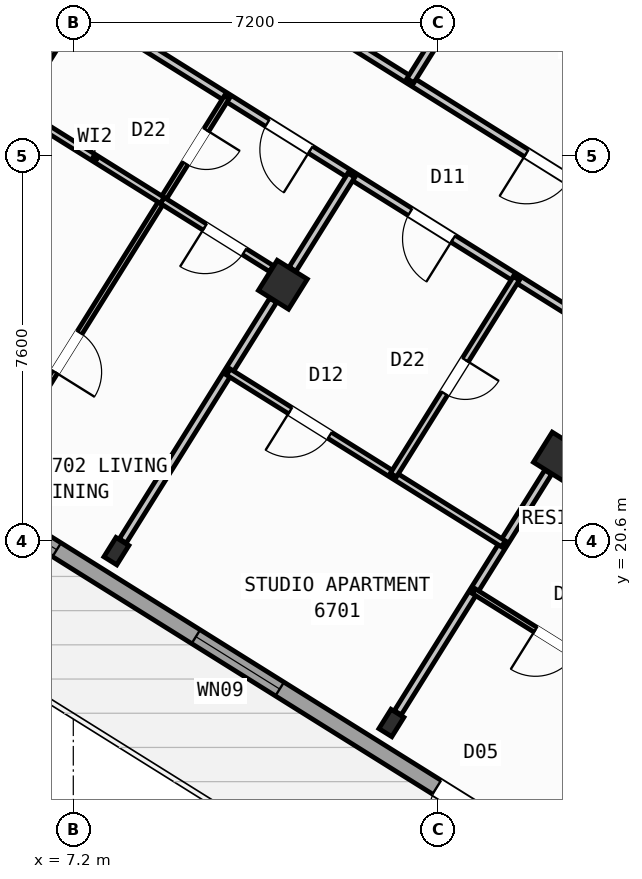
"""IFC4 building model, lengths in metres.
Left out: names, types, materials, properties, quantities, classifications, styles, units other than length and angle.
Written with IfcOpenShell. Run it as: python <this file> out.ifc"""

import sys

from ifc_helpers import new_model, si_unit, direction, frame, frame_2d, origin, origin_2d, place, context, subcontext, project, spatial, rectangle, hollow_rectangle, i_section, extrude, source, transform, mapped, element, fill, save


model = new_model("IFC4")
c1 = context("Model", 3, precision=1e-05, world=origin(), true_north=direction((0.0, 1.0)))
c2 = subcontext(c1, "Body", "Model", "MODEL_VIEW")
j1 = project(units=[si_unit("LENGTHUNIT", "METRE"), si_unit("PLANEANGLEUNIT", "RADIAN")], contexts=[c1])
p1 = place(None, origin())
s1 = spatial("IfcSite", under=j1, at=p1, CompositionType="ELEMENT")
p2 = place(p1, origin())
s2 = spatial("IfcBuilding", under=s1, at=p2, CompositionType="ELEMENT")
p3 = place(p2, frame((0.0, 0.0, 266.4)))
s3 = spatial("IfcBuildingStorey", under=s2, at=p3, CompositionType="ELEMENT", Elevation=266.4)
m1 = source(origin(), c2, "Body", "SweptSolid", [
    extrude(hollow_rectangle(XDim=0.7, YDim=0.7, WallThickness=0.028, at=origin_2d()), origin(), (0.0, 0.0, 1.0), 3.6),
])
p4 = place(p3, frame((16.764, 22.261, 0.0), z_axis=(0.0, 0.0, 1.0), x_axis=(-0.848048096156, 0.529919264233, 0.0)))
e1 = element("IfcColumn", 1, at=p4, inside=s3, PredefinedType="COLUMN", context=c2, shape_type="MappedRepresentation", body=[
    mapped(m1, transform((0.0, 0.0, 0.0), scale=1.0)),
])
m2 = source(origin(), c2, "Body", "SweptSolid", [
    extrude(i_section(OverallWidth=0.3, OverallDepth=0.45, WebThickness=0.014, FlangeThickness=0.026, at=origin_2d()), origin(), (0.0, 0.0, 1.0), 3.6),
])
p5 = place(p3, frame((13.478, 17.003, 0.0), z_axis=(0.0, 0.0, 1.0), x_axis=(-0.848048096156, 0.529919264233, 0.0)))
e2 = element("IfcColumn", 2, at=p5, inside=s3, PredefinedType="COLUMN", context=c2, shape_type="MappedRepresentation", body=[
    mapped(m2, transform((0.0, 0.0, 0.0), scale=1.0)),
])
p6 = place(p3, frame((11.336, 25.653, 0.0), z_axis=(0.0, 0.0, 1.0), x_axis=(-0.848048096156, 0.529919264233, 0.0)))
e3 = element("IfcColumn", 3, at=p6, inside=s3, PredefinedType="COLUMN", context=c2, shape_type="MappedRepresentation", body=[
    mapped(m1, transform((0.0, 0.0, 0.0), scale=1.0)),
])
p7 = place(p3, frame((8.051, 20.395, 0.0), z_axis=(0.0, 0.0, 1.0), x_axis=(-0.848048096156, 0.529919264233, 0.0)))
e4 = element("IfcColumn", 4, at=p7, inside=s3, PredefinedType="COLUMN", context=c2, shape_type="MappedRepresentation", body=[
    mapped(m2, transform((0.0, 0.0, 0.0), scale=1.0)),
])
p8 = place(p3, frame((29.268, 6.429, 0.0), z_axis=(0.0, 0.0, 1.0), x_axis=(-0.848049971435, 0.529916263149, 0.0)))
e5 = element("IfcWall", 5, at=p8, inside=s3, PredefinedType="STANDARD", context=c2, shape_type="SweptSolid", body=[
    extrude(rectangle(XDim=31.588, YDim=0.32, at=frame_2d((15.794, 0.0))), origin(), (0.0, 0.0, 1.0), 3.35),
])
p9 = place(p8, frame((16.362, 0.0, 0.0)))
e6 = element("IfcOpeningElement", 6, at=p9, cuts=e5, PredefinedType="OPENING", context=c2, shape_type="SweptSolid", body=[
    extrude(rectangle(XDim=1.2, YDim=2.15, at=frame_2d((0.6, 1.075))), frame((0.0, 0.17, 0.0), z_axis=(0.0, -1.0, 0.0), x_axis=(1.0, 0.0, 0.0)), (0.0, 0.0, 1.0), 0.34),
])
p10 = place(p8, frame((3.859, 0.0, 0.9)))
e7 = element("IfcOpeningElement", 7, at=p10, cuts=e5, PredefinedType="OPENING", context=c2, shape_type="SweptSolid", body=[
    extrude(rectangle(XDim=1.65, YDim=1.45, at=frame_2d((0.825, 0.725))), frame((0.0, 0.17, 0.0), z_axis=(0.0, -1.0, 0.0), x_axis=(1.0, 0.0, 0.0)), (0.0, 0.0, 1.0), 0.34),
])
p11 = place(p8, frame((10.519, 0.0, 0.9)))
e8 = element("IfcOpeningElement", 8, at=p11, cuts=e5, PredefinedType="OPENING", context=c2, shape_type="SweptSolid", body=[
    extrude(rectangle(XDim=1.65, YDim=1.45, at=frame_2d((0.825, 0.725))), frame((0.0, 0.17, 0.0), z_axis=(0.0, -1.0, 0.0), x_axis=(1.0, 0.0, 0.0)), (0.0, 0.0, 1.0), 0.34),
])
p12 = place(p8, frame((21.219, 0.0, 0.95)))
e9 = element("IfcOpeningElement", 9, at=p12, cuts=e5, PredefinedType="OPENING", context=c2, shape_type="SweptSolid", body=[
    extrude(rectangle(XDim=1.95, YDim=1.35, at=frame_2d((0.975, 0.675))), frame((0.0, 0.17, 0.0), z_axis=(0.0, -1.0, 0.0), x_axis=(1.0, 0.0, 0.0)), (0.0, 0.0, 1.0), 0.34),
])
p13 = place(p8, frame((26.406, 0.0, 1.0)))
e10 = element("IfcOpeningElement", 10, at=p13, cuts=e5, PredefinedType="OPENING", context=c2, shape_type="SweptSolid", body=[
    extrude(rectangle(XDim=0.9, YDim=1.25, at=frame_2d((0.45, 0.625))), frame((0.0, 0.17, 0.0), z_axis=(0.0, -1.0, 0.0), x_axis=(1.0, 0.0, 0.0)), (0.0, 0.0, 1.0), 0.34),
])
p14 = place(p8, frame((29.143, 0.0, 0.9)))
e11 = element("IfcOpeningElement", 11, at=p14, cuts=e5, PredefinedType="OPENING", context=c2, shape_type="SweptSolid", body=[
    extrude(rectangle(XDim=1.65, YDim=1.45, at=frame_2d((0.825, 0.725))), frame((0.0, 0.17, 0.0), z_axis=(0.0, -1.0, 0.0), x_axis=(1.0, 0.0, 0.0)), (0.0, 0.0, 1.0), 0.34),
])
p15 = place(p3, frame((2.415, 23.452, 0.0), z_axis=(0.0, 0.0, 1.0), x_axis=(0.52991049553, 0.848053575387, 0.0)))
e12 = element("IfcWall", 12, at=p15, inside=s3, PredefinedType="STANDARD", context=c2, shape_type="SweptSolid", body=[
    extrude(rectangle(XDim=21.587, YDim=0.32, at=frame_2d((10.794, 0.0))), origin(), (0.0, 0.0, 1.0), 2.875),
])
p16 = place(p15, frame((2.606, 0.0, 0.9)))
e13 = element("IfcOpeningElement", 13, at=p16, cuts=e12, PredefinedType="OPENING", context=c2, shape_type="SweptSolid", body=[
    extrude(rectangle(XDim=1.65, YDim=1.45, at=frame_2d((0.825, 0.725))), frame((0.0, 0.17, 0.0), z_axis=(0.0, -1.0, 0.0), x_axis=(1.0, 0.0, 0.0)), (0.0, 0.0, 1.0), 0.34),
])
p17 = place(p15, frame((7.504, 0.0, 1.0)))
e14 = element("IfcOpeningElement", 14, at=p17, cuts=e12, PredefinedType="OPENING", context=c2, shape_type="SweptSolid", body=[
    extrude(rectangle(XDim=0.9, YDim=1.25, at=frame_2d((0.45, 0.625))), frame((0.0, 0.17, 0.0), z_axis=(0.0, -1.0, 0.0), x_axis=(1.0, 0.0, 0.0)), (0.0, 0.0, 1.0), 0.34),
])
p18 = place(p15, frame((12.084, 0.0, 1.0)))
e15 = element("IfcOpeningElement", 15, at=p18, cuts=e12, PredefinedType="OPENING", context=c2, shape_type="SweptSolid", body=[
    extrude(rectangle(XDim=0.9, YDim=1.25, at=frame_2d((0.45, 0.625))), frame((0.0, 0.17, 0.0), z_axis=(0.0, -1.0, 0.0), x_axis=(1.0, 0.0, 0.0)), (0.0, 0.0, 1.0), 0.34),
])
p19 = place(p15, frame((15.619, 0.0, 1.0)))
e16 = element("IfcOpeningElement", 16, at=p19, cuts=e12, PredefinedType="OPENING", context=c2, shape_type="SweptSolid", body=[
    extrude(rectangle(XDim=0.9, YDim=1.25, at=frame_2d((0.45, 0.625))), frame((0.0, 0.17, 0.0), z_axis=(0.0, -1.0, 0.0), x_axis=(1.0, 0.0, 0.0)), (0.0, 0.0, 1.0), 0.34),
])
p20 = place(p15, frame((18.569, 0.0, 1.0)))
e17 = element("IfcOpeningElement", 17, at=p20, cuts=e12, PredefinedType="OPENING", context=c2, shape_type="SweptSolid", body=[
    extrude(rectangle(XDim=0.9, YDim=1.25, at=frame_2d((0.45, 0.625))), frame((0.0, 0.17, 0.0), z_axis=(0.0, -1.0, 0.0), x_axis=(1.0, 0.0, 0.0)), (0.0, 0.0, 1.0), 0.34),
])
p21 = place(p3, frame((14.138, 41.825, 0.0), z_axis=(0.0, 0.0, 1.0), x_axis=(0.848046498049, -0.529921821731, 0.0)))
e18 = element("IfcWall", 18, at=p21, inside=s3, PredefinedType="STANDARD", context=c2, shape_type="SweptSolid", body=[
    extrude(rectangle(XDim=31.588, YDim=0.32, at=frame_2d((15.794, 0.0))), origin(), (0.0, 0.0, 1.0), 3.35),
])
p22 = place(p21, frame((3.46, 0.0, 0.0)))
e19 = element("IfcOpeningElement", 19, at=p22, cuts=e18, PredefinedType="OPENING", context=c2, shape_type="SweptSolid", body=[
    extrude(rectangle(XDim=1.05, YDim=2.15, at=frame_2d((0.525, 1.075))), frame((0.0, 0.17, 0.0), z_axis=(0.0, -1.0, 0.0), x_axis=(1.0, 0.0, 0.0)), (0.0, 0.0, 1.0), 0.34),
])
p23 = place(p21, frame((0.831, 0.0, 1.0)))
e20 = element("IfcOpeningElement", 20, at=p23, cuts=e18, PredefinedType="OPENING", context=c2, shape_type="SweptSolid", body=[
    extrude(rectangle(XDim=0.9, YDim=1.25, at=frame_2d((0.45, 0.625))), frame((0.0, 0.17, 0.0), z_axis=(0.0, -1.0, 0.0), x_axis=(1.0, 0.0, 0.0)), (0.0, 0.0, 1.0), 0.34),
])
p24 = place(p21, frame((8.719, 0.0, 0.9)))
e21 = element("IfcOpeningElement", 21, at=p24, cuts=e18, PredefinedType="OPENING", context=c2, shape_type="SweptSolid", body=[
    extrude(rectangle(XDim=1.35, YDim=1.45, at=frame_2d((0.675, 0.725))), frame((0.0, 0.17, 0.0), z_axis=(0.0, -1.0, 0.0), x_axis=(1.0, 0.0, 0.0)), (0.0, 0.0, 1.0), 0.34),
])
p25 = place(p21, frame((13.599, 0.0, 0.95)))
e22 = element("IfcOpeningElement", 22, at=p25, cuts=e18, PredefinedType="OPENING", context=c2, shape_type="SweptSolid", body=[
    extrude(rectangle(XDim=1.95, YDim=1.35, at=frame_2d((0.975, 0.675))), frame((0.0, 0.17, 0.0), z_axis=(0.0, -1.0, 0.0), x_axis=(1.0, 0.0, 0.0)), (0.0, 0.0, 1.0), 0.34),
])
p26 = place(p21, frame((17.154, 0.0, 1.0)))
e23 = element("IfcOpeningElement", 23, at=p26, cuts=e18, PredefinedType="OPENING", context=c2, shape_type="SweptSolid", body=[
    extrude(rectangle(XDim=0.9, YDim=1.25, at=frame_2d((0.45, 0.625))), frame((0.0, 0.17, 0.0), z_axis=(0.0, -1.0, 0.0), x_axis=(1.0, 0.0, 0.0)), (0.0, 0.0, 1.0), 0.34),
])
p27 = place(p21, frame((21.719, 0.0, 0.9)))
e24 = element("IfcOpeningElement", 24, at=p27, cuts=e18, PredefinedType="OPENING", context=c2, shape_type="SweptSolid", body=[
    extrude(rectangle(XDim=1.65, YDim=1.45, at=frame_2d((0.825, 0.725))), frame((0.0, 0.17, 0.0), z_axis=(0.0, -1.0, 0.0), x_axis=(1.0, 0.0, 0.0)), (0.0, 0.0, 1.0), 0.34),
])
p28 = place(p21, frame((27.419, 0.0, 0.9)))
e25 = element("IfcOpeningElement", 25, at=p28, cuts=e18, PredefinedType="OPENING", context=c2, shape_type="SweptSolid", body=[
    extrude(rectangle(XDim=1.65, YDim=1.45, at=frame_2d((0.825, 0.725))), frame((0.0, 0.17, 0.0), z_axis=(0.0, -1.0, 0.0), x_axis=(1.0, 0.0, 0.0)), (0.0, 0.0, 1.0), 0.34),
])
p29 = place(p3, frame((21.329, 22.416, 0.0), z_axis=(0.0, 0.0, 1.0), x_axis=(-0.529920220799, -0.848047498427, 0.0)))
e26 = element("IfcWall", 26, at=p29, inside=s3, PredefinedType="PARTITIONING", context=c2, shape_type="SweptSolid", body=[
    extrude(rectangle(XDim=9.2, YDim=0.16, at=frame_2d((4.6, 0.0))), origin(), (0.0, 0.0, 1.0), 3.34),
])
p30 = place(p3, frame((22.495, 24.281, 0.0), z_axis=(0.0, 0.0, 1.0), x_axis=(-0.848052408131, 0.529912363569, 0.0)))
e27 = element("IfcWall", 27, at=p30, inside=s3, PredefinedType="PARTITIONING", context=c2, shape_type="SweptSolid", body=[
    extrude(rectangle(XDim=16.73, YDim=0.16, at=frame_2d((8.365, 0.0))), origin(), (0.0, 0.0, 1.0), 3.34),
])
p31 = place(p30, frame((2.22, 0.0, 0.0)))
e28 = element("IfcOpeningElement", 28, at=p31, cuts=e27, PredefinedType="OPENING", context=c2, shape_type="SweptSolid", body=[
    extrude(rectangle(XDim=0.86, YDim=2.05, at=frame_2d((0.43, 1.025))), frame((0.0, 0.09, 0.0), z_axis=(0.0, -1.0, 0.0), x_axis=(1.0, 0.0, 0.0)), (0.0, 0.0, 1.0), 0.18),
])
p32 = place(p30, frame((6.49, 0.0, 0.0)))
e29 = element("IfcOpeningElement", 29, at=p32, cuts=e27, PredefinedType="OPENING", context=c2, shape_type="SweptSolid", body=[
    extrude(rectangle(XDim=1.0, YDim=2.1, at=frame_2d((0.5, 1.05))), frame((0.0, 0.09, 0.0), z_axis=(0.0, -1.0, 0.0), x_axis=(1.0, 0.0, 0.0)), (0.0, 0.0, 1.0), 0.18),
])
p33 = place(p30, frame((14.76, 0.0, 0.0)))
e30 = element("IfcOpeningElement", 30, at=p33, cuts=e27, PredefinedType="OPENING", context=c2, shape_type="SweptSolid", body=[
    extrude(rectangle(XDim=1.0, YDim=2.1, at=frame_2d((0.5, 1.05))), frame((0.0, 0.09, 0.0), z_axis=(0.0, -1.0, 0.0), x_axis=(1.0, 0.0, 0.0)), (0.0, 0.0, 1.0), 0.18),
])
p34 = place(p3, frame((21.329, 22.416, 0.0), z_axis=(0.0, 0.0, 1.0), x_axis=(-0.848052408131, 0.529912363569, 0.0)))
e31 = element("IfcWall", 31, at=p34, inside=s3, PredefinedType="PARTITIONING", context=c2, shape_type="SweptSolid", body=[
    extrude(rectangle(XDim=16.73, YDim=0.16, at=frame_2d((8.365, 0.0))), origin(), (0.0, 0.0, 1.0), 3.34),
])
p35 = place(p34, frame((1.395, 0.0, 0.0)))
e32 = element("IfcOpeningElement", 32, at=p35, cuts=e31, PredefinedType="OPENING", context=c2, shape_type="SweptSolid", body=[
    extrude(rectangle(XDim=1.0, YDim=2.1, at=frame_2d((0.5, 1.05))), frame((0.0, 0.09, 0.0), z_axis=(0.0, -1.0, 0.0), x_axis=(1.0, 0.0, 0.0)), (0.0, 0.0, 1.0), 0.18),
])
p36 = place(p34, frame((7.82, 0.0, 0.0)))
e33 = element("IfcOpeningElement", 33, at=p36, cuts=e31, PredefinedType="OPENING", context=c2, shape_type="SweptSolid", body=[
    extrude(rectangle(XDim=1.0, YDim=2.1, at=frame_2d((0.5, 1.05))), frame((0.0, 0.09, 0.0), z_axis=(0.0, -1.0, 0.0), x_axis=(1.0, 0.0, 0.0)), (0.0, 0.0, 1.0), 0.18),
])
p37 = place(p34, frame((11.14, 0.0, 0.0)))
e34 = element("IfcOpeningElement", 34, at=p37, cuts=e31, PredefinedType="OPENING", context=c2, shape_type="SweptSolid", body=[
    extrude(rectangle(XDim=1.0, YDim=2.1, at=frame_2d((0.5, 1.05))), frame((0.0, 0.09, 0.0), z_axis=(0.0, -1.0, 0.0), x_axis=(1.0, 0.0, 0.0)), (0.0, 0.0, 1.0), 0.18),
])
p38 = place(p3, frame((16.572, 21.954, 0.0), z_axis=(0.0, 0.0, 1.0), x_axis=(-0.529904903214, -0.848057069748, 0.0)))
e35 = element("IfcWall", 35, at=p38, inside=s3, PredefinedType="PARTITIONING", context=c2, shape_type="SweptSolid", body=[
    extrude(rectangle(XDim=5.601, YDim=0.16, at=frame_2d((2.801, 0.0))), origin(), (0.0, 0.0, 1.0), 2.875),
])
p39 = place(p3, frame((18.318, 17.597, 0.0), z_axis=(0.0, 0.0, 1.0), x_axis=(-0.848059820872, 0.529900500304, 0.0)))
e36 = element("IfcWall", 36, at=p39, inside=s3, PredefinedType="PARTITIONING", context=c2, shape_type="SweptSolid", body=[
    extrude(rectangle(XDim=3.79, YDim=0.11, at=frame_2d((1.895, 0.0))), origin(), (0.0, 0.0, 1.0), 3.34),
])
p40 = place(p39, frame((1.435, 0.0, 0.0)))
e37 = element("IfcOpeningElement", 37, at=p40, cuts=e36, PredefinedType="OPENING", context=c2, shape_type="SweptSolid", body=[
    extrude(rectangle(XDim=0.92, YDim=2.08, at=frame_2d((0.46, 1.04))), frame((0.0, 0.065, 0.0), z_axis=(0.0, -1.0, 0.0), x_axis=(1.0, 0.0, 0.0)), (0.0, 0.0, 1.0), 0.13),
])
p41 = place(p3, frame((12.688, 27.815, 0.0), z_axis=(0.0, 0.0, 1.0), x_axis=(-0.52994879608, -0.848029641896, 0.0)))
e38 = element("IfcWall", 38, at=p41, inside=s3, PredefinedType="PARTITIONING", context=c2, shape_type="SweptSolid", body=[
    extrude(rectangle(XDim=2.188, YDim=0.16, at=frame_2d((1.094, 0.0))), origin(), (0.0, 0.0, 1.0), 2.875),
])
p42 = place(p3, frame((11.144, 25.346, 0.0), z_axis=(0.0, 0.0, 1.0), x_axis=(-0.529904903214, -0.848057069748, 0.0)))
e39 = element("IfcWall", 39, at=p42, inside=s3, PredefinedType="PARTITIONING", context=c2, shape_type="SweptSolid", body=[
    extrude(rectangle(XDim=5.601, YDim=0.16, at=frame_2d((2.801, 0.0))), origin(), (0.0, 0.0, 1.0), 2.875),
])
p43 = place(p3, frame((15.688, 20.54, 0.0), z_axis=(0.0, 0.0, 1.0), x_axis=(-0.848049732085, 0.529916646191, 0.0)))
e40 = element("IfcWall", 40, at=p43, inside=s3, PredefinedType="PLUMBINGWALL", context=c2, shape_type="SweptSolid", body=[
    extrude(rectangle(XDim=6.4, YDim=0.14, at=frame_2d((3.2, 0.0))), origin(), (0.0, 0.0, 1.0), 3.34),
])
p44 = place(p43, frame((4.04, 0.0, 0.0)))
e41 = element("IfcOpeningElement", 41, at=p44, cuts=e40, PredefinedType="OPENING", context=c2, shape_type="SweptSolid", body=[
    extrude(rectangle(XDim=0.92, YDim=2.08, at=frame_2d((0.46, 1.04))), frame((0.0, 0.08, 0.0), z_axis=(0.0, -1.0, 0.0), x_axis=(1.0, 0.0, 0.0)), (0.0, 0.0, 1.0), 0.16),
])
p45 = place(p3, frame((15.944, 25.781, 0.0), z_axis=(0.0, 0.0, 1.0), x_axis=(-0.529917480809, -0.848049210561, 0.0)))
e42 = element("IfcWall", 42, at=p45, inside=s3, PredefinedType="PLUMBINGWALL", context=c2, shape_type="SweptSolid", body=[
    extrude(rectangle(XDim=4.58, YDim=0.14, at=frame_2d((2.29, 0.0))), origin(), (0.0, 0.0, 1.0), 3.34),
])
p46 = place(p45, frame((1.9, 0.0, 0.0)))
e43 = element("IfcOpeningElement", 43, at=p46, cuts=e42, PredefinedType="OPENING", context=c2, shape_type="SweptSolid", body=[
    extrude(rectangle(XDim=0.78, YDim=2.05, at=frame_2d((0.39, 1.025))), frame((0.0, 0.08, 0.0), z_axis=(0.0, -1.0, 0.0), x_axis=(1.0, 0.0, 0.0)), (0.0, 0.0, 1.0), 0.16),
])
p47 = place(p3, frame((10.228, 29.352, 0.0), z_axis=(0.0, 0.0, 1.0), x_axis=(-0.529917830441, -0.848048992088, 0.0)))
e44 = element("IfcWall", 44, at=p47, inside=s3, PredefinedType="PARTITIONING", context=c2, shape_type="SweptSolid", body=[
    extrude(rectangle(XDim=9.47, YDim=0.11, at=frame_2d((4.735, 0.0))), origin(), (0.0, 0.0, 1.0), 3.34),
])
p48 = place(p47, frame((0.76, 0.0, 0.0)))
e45 = element("IfcOpeningElement", 45, at=p48, cuts=e44, PredefinedType="OPENING", context=c2, shape_type="SweptSolid", body=[
    extrude(rectangle(XDim=0.78, YDim=2.05, at=frame_2d((0.39, 1.025))), frame((0.0, 0.065, 0.0), z_axis=(0.0, -1.0, 0.0), x_axis=(1.0, 0.0, 0.0)), (0.0, 0.0, 1.0), 0.13),
])
p49 = place(p47, frame((5.475, 0.0, 0.0)))
e46 = element("IfcOpeningElement", 46, at=p49, cuts=e44, PredefinedType="OPENING", context=c2, shape_type="SweptSolid", body=[
    extrude(rectangle(XDim=0.92, YDim=2.08, at=frame_2d((0.46, 1.04))), frame((0.0, 0.065, 0.0), z_axis=(0.0, -1.0, 0.0), x_axis=(1.0, 0.0, 0.0)), (0.0, 0.0, 1.0), 0.13),
])
p50 = place(p3, frame((11.109, 25.972, 0.0), z_axis=(0.0, 0.0, 1.0), x_axis=(-0.848041534199, 0.529929765415, 0.0)))
e47 = element("IfcWall", 47, at=p50, inside=s3, PredefinedType="PLUMBINGWALL", context=c2, shape_type="SweptSolid", body=[
    extrude(rectangle(XDim=2.538, YDim=0.14, at=frame_2d((1.269, 0.0))), origin(), (0.0, 0.0, 1.0), 2.875),
])
p51 = place(p50, frame((0.628, 0.0, 0.0)))
e48 = element("IfcOpeningElement", 48, at=p51, cuts=e47, PredefinedType="OPENING", context=c2, shape_type="SweptSolid", body=[
    extrude(rectangle(XDim=0.92, YDim=2.08, at=frame_2d((0.46, 1.04))), frame((0.0, 0.08, 0.0), z_axis=(0.0, -1.0, 0.0), x_axis=(1.0, 0.0, 0.0)), (0.0, 0.0, 1.0), 0.16),
])
p52 = place(p3, frame((8.956, 27.317, 0.0), z_axis=(0.0, 0.0, 1.0), x_axis=(-0.848050751193, 0.529915015264, 0.0)))
e49 = element("IfcWall", 49, at=p52, inside=s3, PredefinedType="PLUMBINGWALL", context=c2, shape_type="SweptSolid", body=[
    extrude(rectangle(XDim=3.138, YDim=0.14, at=frame_2d((1.569, 0.0))), origin(), (0.0, 0.0, 1.0), 2.875),
])
p53 = place(p3, frame((15.013, 31.537, 0.0), z_axis=(0.0, 0.0, 1.0), x_axis=(-0.5299186965, -0.848048450915, 0.0)))
e50 = element("IfcWall", 50, at=p53, inside=s3, PredefinedType="PARTITIONING", context=c2, shape_type="SweptSolid", body=[
    extrude(rectangle(XDim=2.188, YDim=0.16, at=frame_2d((1.094, 0.0))), origin(), (0.0, 0.0, 1.0), 2.875),
])
m3 = source(origin(), c2, "Body", "SweptSolid", [
    extrude(rectangle(XDim=1.2, YDim=2.15, at=frame_2d((0.6, 1.075))), frame((0.0, 0.025, 0.0), z_axis=(0.0, -1.0, 0.0), x_axis=(1.0, 0.0, 0.0)), (0.0, 0.0, 1.0), 0.05),
])
p54 = place(p9, origin())
e51 = element("IfcDoor", 51, at=p54, inside=s3, OperationType="SINGLE_SWING_LEFT", PredefinedType="DOOR", context=c2, shape_type="MappedRepresentation", body=[
    mapped(m3, transform((0.0, 0.0, 0.0), scale=1.0)),
])
fill(e6, e51)
m4 = source(origin(), c2, "Body", "SweptSolid", [
    extrude(rectangle(XDim=1.95, YDim=1.35, at=frame_2d((0.975, 0.675))), frame((0.0, 0.03, 0.0), z_axis=(0.0, -1.0, 0.0), x_axis=(1.0, 0.0, 0.0)), (0.0, 0.0, 1.0), 0.06),
])
p55 = place(p12, origin())
e52 = element("IfcWindow", 52, at=p55, inside=s3, PartitioningType="SINGLE_PANEL", PredefinedType="WINDOW", context=c2, shape_type="MappedRepresentation", body=[
    mapped(m4, transform((0.0, 0.0, 0.0), scale=1.0)),
])
fill(e9, e52)
m5 = source(origin(), c2, "Body", "SweptSolid", [
    extrude(rectangle(XDim=0.9, YDim=1.25, at=frame_2d((0.45, 0.625))), frame((0.0, 0.03, 0.0), z_axis=(0.0, -1.0, 0.0), x_axis=(1.0, 0.0, 0.0)), (0.0, 0.0, 1.0), 0.06),
])
p56 = place(p13, origin())
e53 = element("IfcWindow", 53, at=p56, inside=s3, PartitioningType="SINGLE_PANEL", PredefinedType="WINDOW", context=c2, shape_type="MappedRepresentation", body=[
    mapped(m5, transform((0.0, 0.0, 0.0), scale=1.0)),
])
fill(e10, e53)
p57 = place(p17, origin())
e54 = element("IfcWindow", 54, at=p57, inside=s3, PartitioningType="SINGLE_PANEL", PredefinedType="WINDOW", context=c2, shape_type="MappedRepresentation", body=[
    mapped(m5, transform((0.0, 0.0, 0.0), scale=1.0)),
])
fill(e14, e54)
m6 = source(origin(), c2, "Body", "SweptSolid", [
    extrude(rectangle(XDim=0.92, YDim=2.08, at=frame_2d((0.46, 1.04))), frame((0.0, 0.025, 0.0), z_axis=(0.0, -1.0, 0.0), x_axis=(1.0, 0.0, 0.0)), (0.0, 0.0, 1.0), 0.05),
])
p58 = place(p40, origin())
e55 = element("IfcDoor", 55, at=p58, inside=s3, OperationType="SINGLE_SWING_RIGHT", PredefinedType="DOOR", context=c2, shape_type="MappedRepresentation", body=[
    mapped(m6, transform((0.0, 0.0, 0.0), scale=1.0)),
])
fill(e37, e55)
m7 = source(origin(), c2, "Body", "SweptSolid", [
    extrude(rectangle(XDim=1.0, YDim=2.1, at=frame_2d((0.5, 1.05))), frame((0.0, 0.025, 0.0), z_axis=(0.0, -1.0, 0.0), x_axis=(1.0, 0.0, 0.0)), (0.0, 0.0, 1.0), 0.05),
])
p59 = place(p36, origin())
e56 = element("IfcDoor", 56, at=p59, inside=s3, OperationType="SINGLE_SWING_LEFT", PredefinedType="DOOR", context=c2, shape_type="MappedRepresentation", body=[
    mapped(m7, transform((0.0, 0.0, 0.0), scale=1.0)),
])
fill(e33, e56)
p60 = place(p44, origin())
e57 = element("IfcDoor", 57, at=p60, inside=s3, OperationType="SINGLE_SWING_RIGHT", PredefinedType="DOOR", context=c2, shape_type="MappedRepresentation", body=[
    mapped(m6, transform((0.0, 0.0, 0.0), scale=1.0)),
])
fill(e41, e57)
m8 = source(origin(), c2, "Body", "SweptSolid", [
    extrude(rectangle(XDim=0.78, YDim=2.05, at=frame_2d((0.39, 1.025))), frame((0.0, 0.025, 0.0), z_axis=(0.0, -1.0, 0.0), x_axis=(1.0, 0.0, 0.0)), (0.0, 0.0, 1.0), 0.05),
])
p61 = place(p46, origin())
e58 = element("IfcDoor", 58, at=p61, inside=s3, OperationType="SINGLE_SWING_LEFT", PredefinedType="DOOR", context=c2, shape_type="MappedRepresentation", body=[
    mapped(m8, transform((0.0, 0.0, 0.0), scale=1.0)),
])
fill(e43, e58)
p62 = place(p37, origin())
e59 = element("IfcDoor", 59, at=p62, inside=s3, OperationType="SINGLE_SWING_LEFT", PredefinedType="DOOR", context=c2, shape_type="MappedRepresentation", body=[
    mapped(m7, transform((0.0, 0.0, 0.0), scale=1.0)),
])
fill(e34, e59)
p63 = place(p51, origin())
e60 = element("IfcDoor", 60, at=p63, inside=s3, OperationType="SINGLE_SWING_RIGHT", PredefinedType="DOOR", context=c2, shape_type="MappedRepresentation", body=[
    mapped(m6, transform((0.0, 0.0, 0.0), scale=1.0)),
])
fill(e48, e60)
p64 = place(p48, origin())
e61 = element("IfcDoor", 61, at=p64, inside=s3, OperationType="SINGLE_SWING_LEFT", PredefinedType="DOOR", context=c2, shape_type="MappedRepresentation", body=[
    mapped(m8, transform((0.0, 0.0, 0.0), scale=1.0)),
])
fill(e45, e61)
p65 = place(p49, origin())
e62 = element("IfcDoor", 62, at=p65, inside=s3, OperationType="SINGLE_SWING_RIGHT", PredefinedType="DOOR", context=c2, shape_type="MappedRepresentation", body=[
    mapped(m6, transform((0.0, 0.0, 0.0), scale=1.0)),
])
fill(e46, e62)
p66 = place(p32, origin())
e63 = element("IfcDoor", 63, at=p66, inside=s3, OperationType="SINGLE_SWING_RIGHT", PredefinedType="DOOR", context=c2, shape_type="MappedRepresentation", body=[
    mapped(m7, transform((0.0, 0.0, 0.0), scale=1.0)),
])
fill(e29, e63)
save(model, sys.argv[1])
